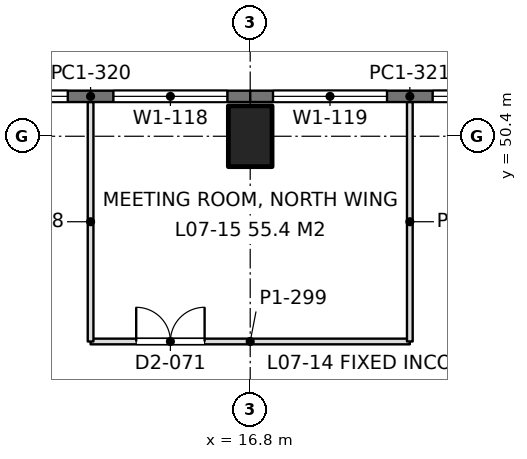
"""IFC4 building model, lengths in metres.
Left out: names, types, materials, properties, quantities, classifications, styles, units other than length and angle.
Written with IfcOpenShell. Run it as: python <this file> out.ifc"""

import sys

from ifc_helpers import new_model, si_unit, direction, frame, frame_2d, origin, origin_2d, place, context, subcontext, project, spatial, rectangle, extrude, element, fill, save


model = new_model("IFC4")
c1 = context("Model", 3, precision=1e-05, world=origin(), true_north=direction((0.0, 1.0)))
c2 = subcontext(c1, "Body", "Model", "MODEL_VIEW")
j1 = project(units=[si_unit("LENGTHUNIT", "METRE"), si_unit("PLANEANGLEUNIT", "RADIAN")], contexts=[c1])
p1 = place(None, origin())
s1 = spatial("IfcSite", under=j1, at=p1, CompositionType="ELEMENT")
p2 = place(p1, origin())
s2 = spatial("IfcBuilding", under=s1, at=p2, CompositionType="ELEMENT")
p3 = place(p2, frame((0.0, 0.0, 32.4)))
s3 = spatial("IfcBuildingStorey", under=s2, at=p3, CompositionType="ELEMENT", Elevation=32.4)
p4 = place(p3, frame((16.8, 50.4, 0.0), z_axis=(0.0, 0.0, 1.0), x_axis=(1.0, 0.0, 0.0)))
e1 = element("IfcColumn", 1, at=p4, inside=s3, PredefinedType="COLUMN", context=c2, shape_type="SweptSolid", body=[
    extrude(rectangle(XDim=1.15, YDim=1.6, at=origin_2d()), origin(), (0.0, 0.0, 1.0), 4.5),
])
p5 = place(p3, frame((8.4, 51.45, 0.0), z_axis=(0.0, 0.0, 1.0), x_axis=(1.0, 0.0, 0.0)))
e2 = element("IfcWall", 2, at=p5, inside=s3, PredefinedType="SOLIDWALL", context=c2, shape_type="SweptSolid", body=[
    extrude(rectangle(XDim=8.4, YDim=0.3, at=frame_2d((4.2, 0.0))), origin(), (0.0, 0.0, 1.0), 4.34),
])
p6 = place(p5, frame((0.6, 0.0, 0.9)))
e3 = element("IfcOpeningElement", 3, at=p6, cuts=e2, PredefinedType="OPENING", context=c2, shape_type="SweptSolid", body=[
    extrude(rectangle(XDim=3.0, YDim=1.9, at=frame_2d((1.5, 0.95))), frame((0.0, 0.16, 0.0), z_axis=(0.0, -1.0, 0.0), x_axis=(1.0, 0.0, 0.0)), (0.0, 0.0, 1.0), 0.32),
])
p7 = place(p5, frame((4.8, 0.0, 0.9)))
e4 = element("IfcOpeningElement", 4, at=p7, cuts=e2, PredefinedType="OPENING", context=c2, shape_type="SweptSolid", body=[
    extrude(rectangle(XDim=3.0, YDim=1.9, at=frame_2d((1.5, 0.95))), frame((0.0, 0.16, 0.0), z_axis=(0.0, -1.0, 0.0), x_axis=(1.0, 0.0, 0.0)), (0.0, 0.0, 1.0), 0.32),
])
p8 = place(p3, frame((16.8, 51.45, 0.0), z_axis=(0.0, 0.0, 1.0), x_axis=(1.0, 0.0, 0.0)))
e5 = element("IfcWall", 5, at=p8, inside=s3, PredefinedType="SOLIDWALL", context=c2, shape_type="SweptSolid", body=[
    extrude(rectangle(XDim=8.4, YDim=0.3, at=frame_2d((4.2, 0.0))), origin(), (0.0, 0.0, 1.0), 4.34),
])
p9 = place(p8, frame((0.6, 0.0, 0.9)))
e6 = element("IfcOpeningElement", 6, at=p9, cuts=e5, PredefinedType="OPENING", context=c2, shape_type="SweptSolid", body=[
    extrude(rectangle(XDim=3.0, YDim=1.9, at=frame_2d((1.5, 0.95))), frame((0.0, 0.16, 0.0), z_axis=(0.0, -1.0, 0.0), x_axis=(1.0, 0.0, 0.0)), (0.0, 0.0, 1.0), 0.32),
])
p10 = place(p8, frame((4.8, 0.0, 0.9)))
e7 = element("IfcOpeningElement", 7, at=p10, cuts=e5, PredefinedType="OPENING", context=c2, shape_type="SweptSolid", body=[
    extrude(rectangle(XDim=3.0, YDim=1.9, at=frame_2d((1.5, 0.95))), frame((0.0, 0.16, 0.0), z_axis=(0.0, -1.0, 0.0), x_axis=(1.0, 0.0, 0.0)), (0.0, 0.0, 1.0), 0.32),
])
p11 = place(p3, frame((12.6, 45.0, 0.0), z_axis=(0.0, 0.0, 1.0), x_axis=(1.0, 0.0, 0.0)))
e8 = element("IfcWall", 8, at=p11, inside=s3, PredefinedType="PARTITIONING", context=c2, shape_type="SweptSolid", body=[
    extrude(rectangle(XDim=8.4, YDim=0.15, at=frame_2d((4.2, 0.0))), origin(), (0.0, 0.0, 1.0), 3.74),
])
p12 = place(p11, frame((1.2, 0.0, 0.0)))
e9 = element("IfcOpeningElement", 9, at=p12, cuts=e8, PredefinedType="OPENING", context=c2, shape_type="SweptSolid", body=[
    extrude(rectangle(XDim=1.8, YDim=2.2, at=frame_2d((0.9, 1.1))), frame((0.0, 0.085, 0.0), z_axis=(0.0, -1.0, 0.0), x_axis=(1.0, 0.0, 0.0)), (0.0, 0.0, 1.0), 0.17),
])
for number, where, z_axis, x_axis in (
    (10, (12.6, 45.0, 0.0), (0.0, 0.0, 1.0), (0.0, 1.0, 0.0)),
    (11, (21.0, 45.0, 0.0), (0.0, 0.0, 1.0), (0.0, 1.0, 0.0)),
):
    element("IfcWall", number, at=place(p3, frame(where, z_axis=z_axis, x_axis=x_axis)), inside=s3, PredefinedType="PARTITIONING", context=c2, shape_type="SweptSolid", body=[
        extrude(rectangle(XDim=6.302, YDim=0.15, at=frame_2d((3.151, 0.0))), origin(), (0.0, 0.0, 1.0), 3.84),
    ])
p13 = place(p6, origin())
e12 = element("IfcWindow", 12, at=p13, inside=s3, PartitioningType="SINGLE_PANEL", PredefinedType="WINDOW", context=c2, shape_type="SweptSolid", body=[
    extrude(rectangle(XDim=3.0, YDim=1.9, at=frame_2d((1.5, 0.95))), frame((0.0, 0.03, 0.0), z_axis=(0.0, -1.0, 0.0), x_axis=(1.0, 0.0, 0.0)), (0.0, 0.0, 1.0), 0.06),
])
fill(e3, e12)
p14 = place(p7, origin())
e13 = element("IfcWindow", 13, at=p14, inside=s3, PartitioningType="SINGLE_PANEL", PredefinedType="WINDOW", context=c2, shape_type="SweptSolid", body=[
    extrude(rectangle(XDim=3.0, YDim=1.9, at=frame_2d((1.5, 0.95))), frame((0.0, 0.03, 0.0), z_axis=(0.0, -1.0, 0.0), x_axis=(1.0, 0.0, 0.0)), (0.0, 0.0, 1.0), 0.06),
])
fill(e4, e13)
p15 = place(p9, origin())
e14 = element("IfcWindow", 14, at=p15, inside=s3, PartitioningType="SINGLE_PANEL", PredefinedType="WINDOW", context=c2, shape_type="SweptSolid", body=[
    extrude(rectangle(XDim=3.0, YDim=1.9, at=frame_2d((1.5, 0.95))), frame((0.0, 0.03, 0.0), z_axis=(0.0, -1.0, 0.0), x_axis=(1.0, 0.0, 0.0)), (0.0, 0.0, 1.0), 0.06),
])
fill(e6, e14)
p16 = place(p10, origin())
e15 = element("IfcWindow", 15, at=p16, inside=s3, PartitioningType="SINGLE_PANEL", PredefinedType="WINDOW", context=c2, shape_type="SweptSolid", body=[
    extrude(rectangle(XDim=3.0, YDim=1.9, at=frame_2d((1.5, 0.95))), frame((0.0, 0.03, 0.0), z_axis=(0.0, -1.0, 0.0), x_axis=(1.0, 0.0, 0.0)), (0.0, 0.0, 1.0), 0.06),
])
fill(e7, e15)
p17 = place(p12, origin())
e16 = element("IfcDoor", 16, at=p17, inside=s3, OperationType="DOUBLE_DOOR_SINGLE_SWING", PredefinedType="DOOR", context=c2, shape_type="SweptSolid", body=[
    extrude(rectangle(XDim=1.8, YDim=2.2, at=frame_2d((0.9, 1.1))), frame((0.0, 0.025, 0.0), z_axis=(0.0, -1.0, 0.0), x_axis=(1.0, 0.0, 0.0)), (0.0, 0.0, 1.0), 0.05),
])
fill(e9, e16)
save(model, sys.argv[1])
